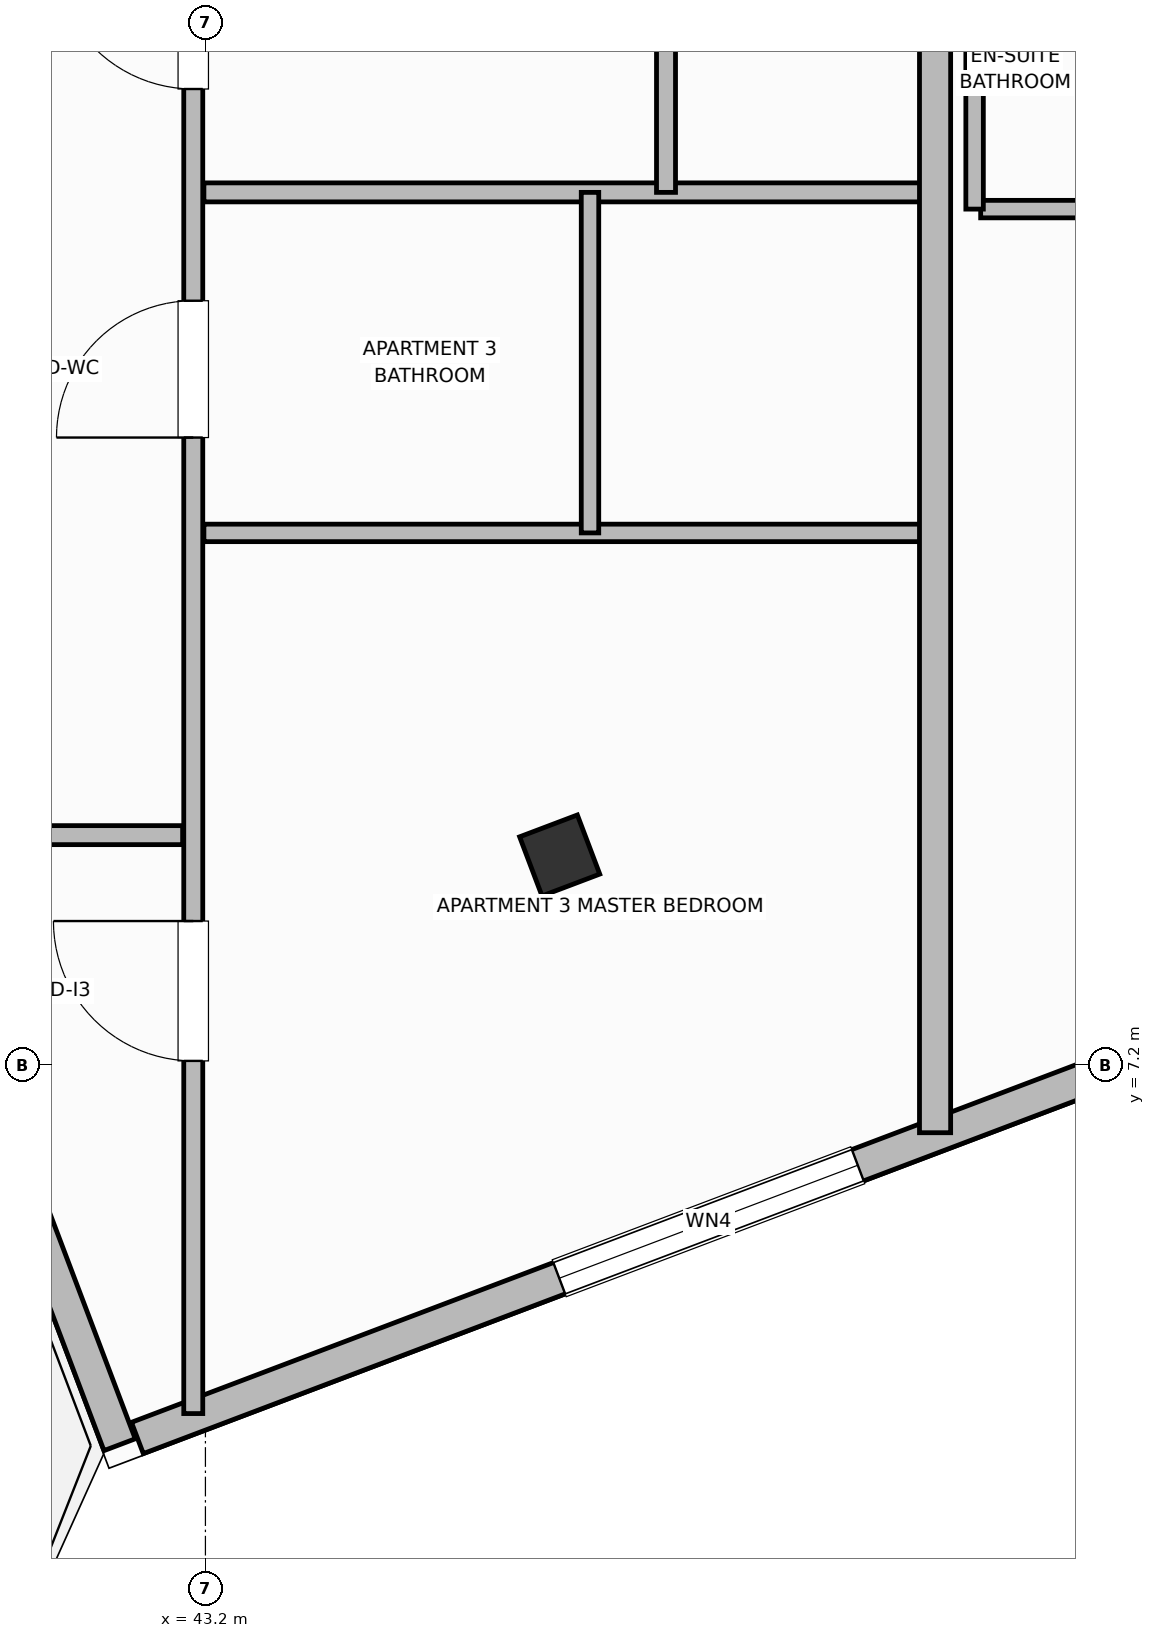
"""IFC4 building model, lengths in metres.
Left out: names, types, materials, properties, quantities, classifications, styles, units other than length and angle.
Written with IfcOpenShell. Run it as: python <this file> out.ifc"""

import sys

from ifc_helpers import new_model, si_unit, direction, frame, frame_2d, origin, origin_2d, place, context, subcontext, project, spatial, rectangle, i_section, extrude, element, fill, save


model = new_model("IFC4")
c1 = context("Model", 3, precision=1e-05, world=origin(), true_north=direction((0.0, 1.0)))
c2 = subcontext(c1, "Body", "Model", "MODEL_VIEW")
j1 = project(units=[si_unit("LENGTHUNIT", "METRE"), si_unit("PLANEANGLEUNIT", "RADIAN")], contexts=[c1])
p1 = place(None, origin())
s1 = spatial("IfcSite", under=j1, at=p1, CompositionType="ELEMENT")
p2 = place(p1, origin())
s2 = spatial("IfcBuilding", under=s1, at=p2, CompositionType="ELEMENT")
p3 = place(p2, frame((0.0, 0.0, 227.5)))
s3 = spatial("IfcBuildingStorey", under=s2, at=p3, CompositionType="ELEMENT", Elevation=227.5)
p4 = place(p3, frame((45.531, 8.578, 0.0), z_axis=(0.0, 0.0, 1.0), x_axis=(0.935221751401, 0.354062530786, 0.0)))
e1 = element("IfcColumn", 1, at=p4, inside=s3, PredefinedType="COLUMN", context=c2, shape_type="SweptSolid", body=[
    extrude(i_section(OverallWidth=0.406, OverallDepth=0.416, WebThickness=0.03, FlangeThickness=0.048, FilletRadius=0.025, at=origin_2d()), origin(), (0.0, 0.0, 1.0), 3.7),
])
p5 = place(p3, frame((41.892, 6.666, 0.0), z_axis=(0.0, 0.0, 1.0), x_axis=(0.354128469405, -0.935196785258, 0.0)))
e2 = element("IfcWall", 2, at=p5, inside=s3, PredefinedType="SOLIDWALL", context=c2, shape_type="SweptSolid", body=[
    extrude(rectangle(XDim=2.1, YDim=0.22, at=frame_2d((1.05, 0.0))), origin(), (0.0, 0.0, 1.0), 2.73),
])
p6 = place(p3, frame((42.752, 4.746, 0.0), z_axis=(0.0, 0.0, 1.0), x_axis=(0.935216926991, 0.354075273733, 0.0)))
e3 = element("IfcWall", 3, at=p6, inside=s3, PredefinedType="SOLIDWALL", context=c2, shape_type="SweptSolid", body=[
    extrude(rectangle(XDim=8.035, YDim=0.22, at=frame_2d((4.018, 0.0))), origin(), (0.0, 0.0, 1.0), 2.73),
])
p7 = place(p6, frame((2.968, 0.0, 0.8)))
e4 = element("IfcOpeningElement", 4, at=p7, cuts=e3, PredefinedType="OPENING", context=c2, shape_type="SweptSolid", body=[
    extrude(rectangle(XDim=2.1, YDim=1.75, at=frame_2d((1.05, 0.875))), frame((0.0, 0.12, 0.0), z_axis=(0.0, -1.0, 0.0), x_axis=(1.0, 0.0, 0.0)), (0.0, 0.0, 1.0), 0.24),
])
p8 = place(p3, frame((35.58, 8.712, 0.0), z_axis=(0.0, 0.0, 1.0), x_axis=(1.0, 0.0, 0.0)))
e5 = element("IfcWall", 5, at=p8, inside=s3, PredefinedType="PARTITIONING", context=c2, shape_type="SweptSolid", body=[
    extrude(rectangle(XDim=7.47, YDim=0.125, at=frame_2d((3.735, 0.0))), origin(), (0.0, 0.0, 1.0), 3.45),
])
p9 = place(p8, frame((3.362, 0.0, 0.0)))
e6 = element("IfcOpeningElement", 6, at=p9, cuts=e5, PredefinedType="OPENING", context=c2, shape_type="SweptSolid", body=[
    extrude(rectangle(XDim=0.92, YDim=2.05, at=frame_2d((0.46, 1.025))), frame((0.0, 0.073, 0.0), z_axis=(0.0, -1.0, 0.0), x_axis=(1.0, 0.0, 0.0)), (0.0, 0.0, 1.0), 0.145),
])
p10 = place(p3, frame((43.12, 4.907, 0.0), z_axis=(0.0, 0.0, 1.0), x_axis=(0.0, 1.0, 0.0)))
e7 = element("IfcWall", 7, at=p10, inside=s3, PredefinedType="PARTITIONING", context=c2, shape_type="SweptSolid", body=[
    extrude(rectangle(XDim=10.443, YDim=0.125, at=frame_2d((5.222, 0.0))), origin(), (0.0, 0.0, 1.0), 3.45),
])
p11 = place(p10, frame((2.32, 0.0, 0.0)))
e8 = element("IfcOpeningElement", 8, at=p11, cuts=e7, PredefinedType="OPENING", context=c2, shape_type="SweptSolid", body=[
    extrude(rectangle(XDim=0.92, YDim=2.05, at=frame_2d((0.46, 1.025))), frame((0.0, 0.073, 0.0), z_axis=(0.0, -1.0, 0.0), x_axis=(1.0, 0.0, 0.0)), (0.0, 0.0, 1.0), 0.145),
])
p12 = place(p10, frame((6.42, 0.0, 0.0)))
e9 = element("IfcOpeningElement", 9, at=p12, cuts=e7, PredefinedType="OPENING", context=c2, shape_type="SweptSolid", body=[
    extrude(rectangle(XDim=0.9, YDim=2.05, at=frame_2d((0.45, 1.025))), frame((0.0, 0.073, 0.0), z_axis=(0.0, -1.0, 0.0), x_axis=(1.0, 0.0, 0.0)), (0.0, 0.0, 1.0), 0.145),
])
p13 = place(p10, frame((8.713, 0.0, 0.0)))
e10 = element("IfcOpeningElement", 10, at=p13, cuts=e7, PredefinedType="OPENING", context=c2, shape_type="SweptSolid", body=[
    extrude(rectangle(XDim=0.92, YDim=2.05, at=frame_2d((0.46, 1.025))), frame((0.0, 0.073, 0.0), z_axis=(0.0, -1.0, 0.0), x_axis=(1.0, 0.0, 0.0)), (0.0, 0.0, 1.0), 0.145),
])
p14 = place(p3, frame((43.19, 12.94, 0.0), z_axis=(0.0, 0.0, 1.0), x_axis=(1.0, 0.0, 0.0)))
e11 = element("IfcWall", 11, at=p14, inside=s3, PredefinedType="PARTITIONING", context=c2, shape_type="SweptSolid", body=[
    extrude(rectangle(XDim=4.73, YDim=0.125, at=frame_2d((2.365, 0.0))), origin(), (0.0, 0.0, 1.0), 3.018),
])
p15 = place(p3, frame((43.19, 10.7, 0.0), z_axis=(0.0, 0.0, 1.0), x_axis=(1.0, 0.0, 0.0)))
e12 = element("IfcWall", 12, at=p15, inside=s3, PredefinedType="PARTITIONING", context=c2, shape_type="SweptSolid", body=[
    extrude(rectangle(XDim=4.73, YDim=0.115, at=frame_2d((2.365, 0.0))), origin(), (0.0, 0.0, 1.0), 3.45),
])
p16 = place(p3, frame((46.23, 12.94, 0.0), z_axis=(0.0, 0.0, 1.0), x_axis=(0.0, 1.0, 0.0)))
e13 = element("IfcWall", 13, at=p16, inside=s3, PredefinedType="PARTITIONING", context=c2, shape_type="SweptSolid", body=[
    extrude(rectangle(XDim=2.41, YDim=0.125, at=frame_2d((1.205, 0.0))), origin(), (0.0, 0.0, 1.0), 3.45),
])
p17 = place(p3, frame((45.73, 10.7, 0.0), z_axis=(0.0, 0.0, 1.0), x_axis=(0.0, 1.0, 0.0)))
e14 = element("IfcWall", 14, at=p17, inside=s3, PredefinedType="PARTITIONING", context=c2, shape_type="SweptSolid", body=[
    extrude(rectangle(XDim=2.24, YDim=0.115, at=frame_2d((1.12, 0.0))), origin(), (0.0, 0.0, 1.0), 3.45),
])
p18 = place(p3, frame((48.0, 6.754, 0.0), z_axis=(0.0, 0.0, 1.0), x_axis=(0.0, 1.0, 0.0)))
e15 = element("IfcWall", 15, at=p18, inside=s3, PredefinedType="PARTITIONING", context=c2, shape_type="SweptSolid", body=[
    extrude(rectangle(XDim=8.596, YDim=0.205, at=frame_2d((4.298, 0.0))), origin(), (0.0, 0.0, 1.0), 3.45),
])
p19 = place(p3, frame((48.3, 12.83, 0.0), z_axis=(0.0, 0.0, 1.0), x_axis=(1.0, 0.0, 0.0)))
e16 = element("IfcWall", 16, at=p19, inside=s3, PredefinedType="PARTITIONING", context=c2, shape_type="SweptSolid", body=[
    extrude(rectangle(XDim=2.15, YDim=0.115, at=frame_2d((1.075, 0.0))), origin(), (0.0, 0.0, 1.0), 3.45),
])
p20 = place(p3, frame((48.26, 12.83, 0.0), z_axis=(0.0, 0.0, 1.0), x_axis=(0.0, 1.0, 0.0)))
e17 = element("IfcWall", 17, at=p20, inside=s3, PredefinedType="PARTITIONING", context=c2, shape_type="SweptSolid", body=[
    extrude(rectangle(XDim=2.52, YDim=0.115, at=frame_2d((1.26, 0.0))), origin(), (0.0, 0.0, 1.0), 3.45),
])
p21 = place(p7, origin())
e18 = element("IfcWindow", 18, at=p21, inside=s3, PartitioningType="SINGLE_PANEL", PredefinedType="WINDOW", context=c2, shape_type="SweptSolid", body=[
    extrude(rectangle(XDim=2.1, YDim=1.75, at=frame_2d((1.05, 0.875))), frame((0.0, 0.03, 0.0), z_axis=(0.0, -1.0, 0.0), x_axis=(1.0, 0.0, 0.0)), (0.0, 0.0, 1.0), 0.06),
])
fill(e4, e18)
p22 = place(p11, origin())
e19 = element("IfcDoor", 19, at=p22, inside=s3, OperationType="SINGLE_SWING_RIGHT", PredefinedType="DOOR", context=c2, shape_type="SweptSolid", body=[
    extrude(rectangle(XDim=0.92, YDim=2.05, at=frame_2d((0.46, 1.025))), frame((0.0, 0.025, 0.0), z_axis=(0.0, -1.0, 0.0), x_axis=(1.0, 0.0, 0.0)), (0.0, 0.0, 1.0), 0.05),
])
fill(e8, e19)
p23 = place(p12, origin())
e20 = element("IfcDoor", 20, at=p23, inside=s3, OperationType="SINGLE_SWING_LEFT", PredefinedType="DOOR", context=c2, shape_type="SweptSolid", body=[
    extrude(rectangle(XDim=0.9, YDim=2.05, at=frame_2d((0.45, 1.025))), frame((0.0, 0.025, 0.0), z_axis=(0.0, -1.0, 0.0), x_axis=(1.0, 0.0, 0.0)), (0.0, 0.0, 1.0), 0.05),
])
fill(e9, e20)
p24 = place(p13, origin())
e21 = element("IfcDoor", 21, at=p24, inside=s3, OperationType="SINGLE_SWING_RIGHT", PredefinedType="DOOR", context=c2, shape_type="SweptSolid", body=[
    extrude(rectangle(XDim=0.92, YDim=2.05, at=frame_2d((0.46, 1.025))), frame((0.0, 0.025, 0.0), z_axis=(0.0, -1.0, 0.0), x_axis=(1.0, 0.0, 0.0)), (0.0, 0.0, 1.0), 0.05),
])
fill(e10, e21)
save(model, sys.argv[1])
